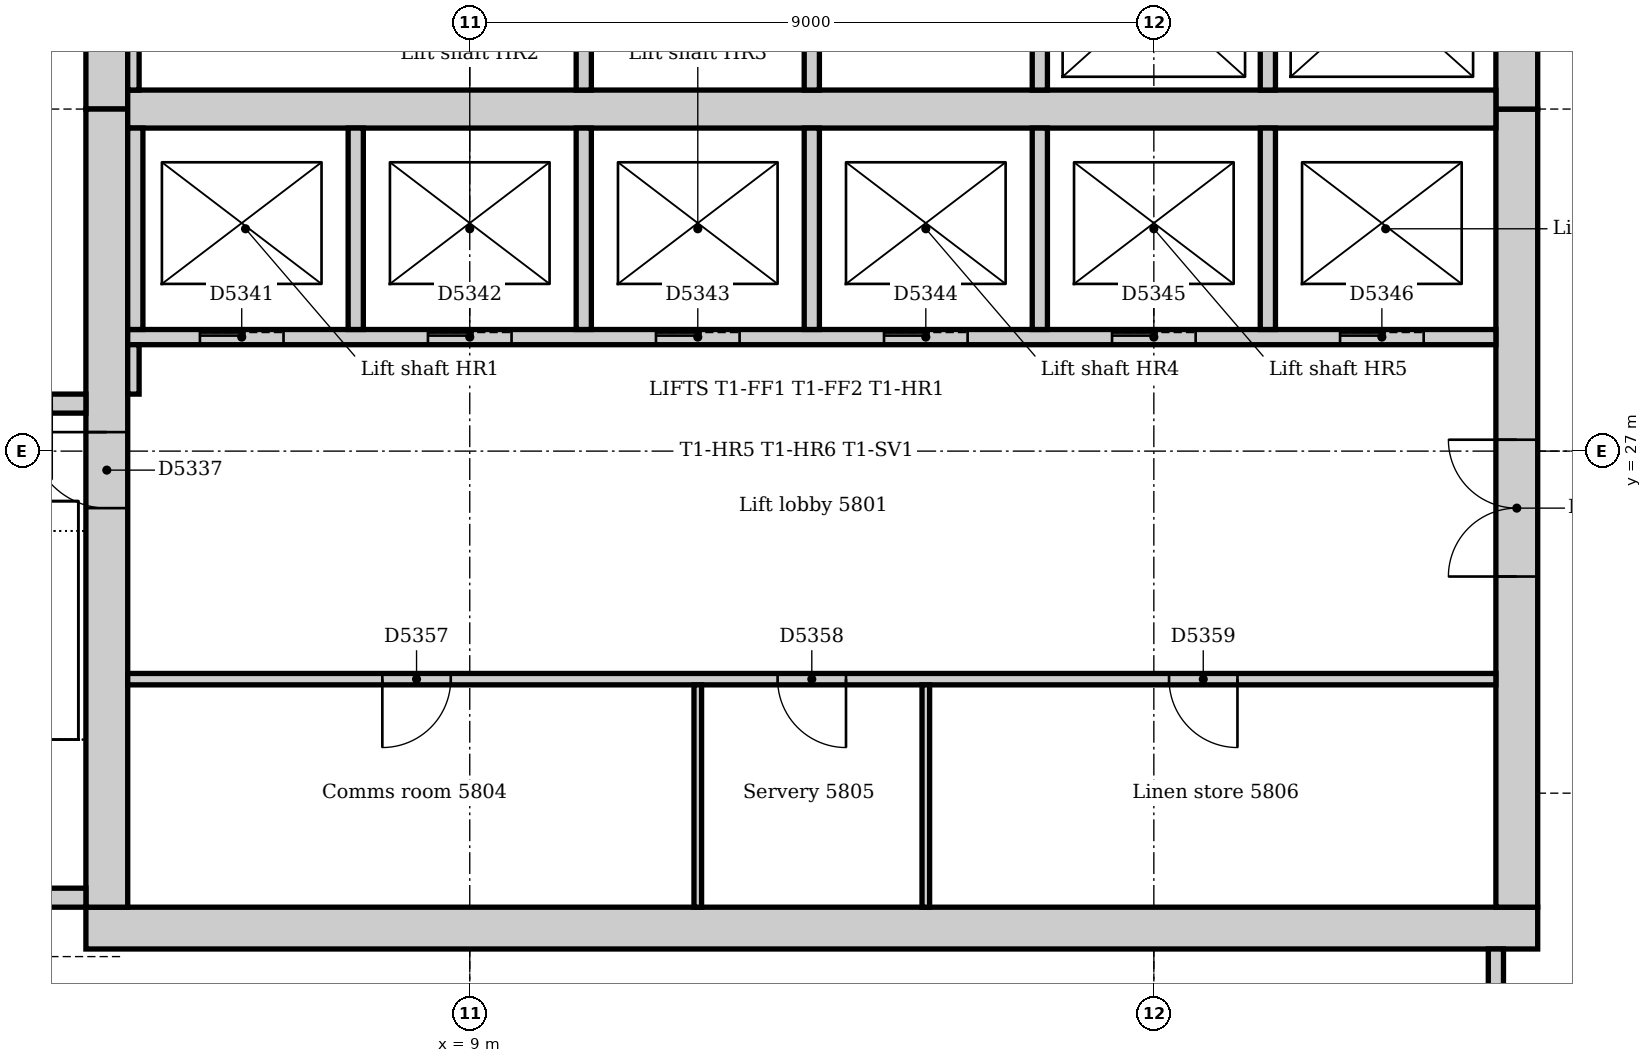
"""IFC4 building model, lengths in metres.
Left out: names, types, materials, properties, quantities, classifications, styles, units other than length and angle.
Written with IfcOpenShell. Run it as: python <this file> out.ifc"""

import sys

from ifc_helpers import new_model, si_unit, direction, frame, frame_2d, origin, place, context, subcontext, project, spatial, rectangle, extrude, element, fill, save


model = new_model("IFC4")
c1 = context("Model", 3, precision=1e-05, world=origin(), true_north=direction((0.0, 1.0)))
c2 = subcontext(c1, "Body", "Model", "MODEL_VIEW")
j1 = project(units=[si_unit("LENGTHUNIT", "METRE"), si_unit("PLANEANGLEUNIT", "RADIAN")], contexts=[c1])
p1 = place(None, origin())
s1 = spatial("IfcSite", under=j1, at=p1, CompositionType="ELEMENT")
p2 = place(p1, origin())
s2 = spatial("IfcBuilding", under=s1, at=p2, CompositionType="ELEMENT")
p3 = place(p2, frame((0.0, 0.0, 242.0)))
s3 = spatial("IfcBuildingStorey", under=s2, at=p3, CompositionType="ELEMENT", Elevation=242.0)
p4 = place(p3, frame((3.95, 20.725, 0.0), z_axis=(0.0, 0.0, 1.0), x_axis=(1.0, 0.0, 0.0)))
e1 = element("IfcWall", 1, at=p4, inside=s3, PredefinedType="SOLIDWALL", context=c2, shape_type="SweptSolid", body=[
    extrude(rectangle(XDim=19.1, YDim=0.55, at=frame_2d((9.55, 0.0))), origin(), (0.0, 0.0, 1.0), 5.0),
])
p5 = place(p3, frame((22.775, 21.0, 0.0), z_axis=(0.0, 0.0, 1.0), x_axis=(0.0, 1.0, 0.0)))
e2 = element("IfcWall", 2, at=p5, inside=s3, PredefinedType="SOLIDWALL", context=c2, shape_type="SweptSolid", body=[
    extrude(rectangle(XDim=10.5, YDim=0.55, at=frame_2d((5.25, 0.0))), origin(), (0.0, 0.0, 1.0), 5.0),
])
p6 = place(p5, frame((4.35, 0.0, 0.0)))
e3 = element("IfcOpeningElement", 3, at=p6, cuts=e2, PredefinedType="OPENING", context=c2, shape_type="SweptSolid", body=[
    extrude(rectangle(XDim=1.8, YDim=2.1, at=frame_2d((0.9, 1.05))), frame((0.0, 0.285, 0.0), z_axis=(0.0, -1.0, 0.0), x_axis=(1.0, 0.0, 0.0)), (0.0, 0.0, 1.0), 0.57),
])
p7 = place(p3, frame((22.775, 31.5, 0.0), z_axis=(0.0, 0.0, 1.0), x_axis=(0.0, 1.0, 0.0)))
e4 = element("IfcWall", 4, at=p7, inside=s3, PredefinedType="SOLIDWALL", context=c2, shape_type="SweptSolid", body=[
    extrude(rectangle(XDim=10.5, YDim=0.55, at=frame_2d((5.25, 0.0))), origin(), (0.0, 0.0, 1.0), 5.0),
])
p8 = place(p7, frame((3.15, 0.0, 0.0)))
e5 = element("IfcOpeningElement", 5, at=p8, cuts=e4, PredefinedType="OPENING", context=c2, shape_type="SweptSolid", body=[
    extrude(rectangle(XDim=1.0, YDim=2.1, at=frame_2d((0.5, 1.05))), frame((0.0, 0.285, 0.0), z_axis=(0.0, -1.0, 0.0), x_axis=(1.0, 0.0, 0.0)), (0.0, 0.0, 1.0), 0.57),
])
p9 = place(p7, frame((5.2, 0.0, 0.0)))
e6 = element("IfcOpeningElement", 6, at=p9, cuts=e4, PredefinedType="OPENING", context=c2, shape_type="SweptSolid", body=[
    extrude(rectangle(XDim=1.0, YDim=2.1, at=frame_2d((0.5, 1.05))), frame((0.0, 0.285, 0.0), z_axis=(0.0, -1.0, 0.0), x_axis=(1.0, 0.0, 0.0)), (0.0, 0.0, 1.0), 0.57),
])
p10 = place(p3, frame((4.225, 42.0, 0.0), z_axis=(0.0, 0.0, 1.0), x_axis=(0.0, -1.0, 0.0)))
e7 = element("IfcWall", 7, at=p10, inside=s3, PredefinedType="SOLIDWALL", context=c2, shape_type="SweptSolid", body=[
    extrude(rectangle(XDim=10.5, YDim=0.55, at=frame_2d((5.25, 0.0))), origin(), (0.0, 0.0, 1.0), 5.0),
])
p11 = place(p10, frame((5.3, 0.0, 0.0)))
e8 = element("IfcOpeningElement", 8, at=p11, cuts=e7, PredefinedType="OPENING", context=c2, shape_type="SweptSolid", body=[
    extrude(rectangle(XDim=1.0, YDim=2.1, at=frame_2d((0.5, 1.05))), frame((0.0, 0.285, 0.0), z_axis=(0.0, -1.0, 0.0), x_axis=(1.0, 0.0, 0.0)), (0.0, 0.0, 1.0), 0.57),
])
p12 = place(p3, frame((4.225, 31.5, 0.0), z_axis=(0.0, 0.0, 1.0), x_axis=(0.0, -1.0, 0.0)))
e9 = element("IfcWall", 9, at=p12, inside=s3, PredefinedType="SOLIDWALL", context=c2, shape_type="SweptSolid", body=[
    extrude(rectangle(XDim=10.5, YDim=0.55, at=frame_2d((5.25, 0.0))), origin(), (0.0, 0.0, 1.0), 5.0),
])
p13 = place(p12, frame((4.25, 0.0, 0.0)))
e10 = element("IfcOpeningElement", 10, at=p13, cuts=e9, PredefinedType="OPENING", context=c2, shape_type="SweptSolid", body=[
    extrude(rectangle(XDim=1.0, YDim=2.1, at=frame_2d((0.5, 1.05))), frame((0.0, 0.285, 0.0), z_axis=(0.0, -1.0, 0.0), x_axis=(1.0, 0.0, 0.0)), (0.0, 0.0, 1.0), 0.57),
])
p14 = place(p3, frame((4.5, 31.5, 0.0), z_axis=(0.0, 0.0, 1.0), x_axis=(1.0, 0.0, 0.0)))
e11 = element("IfcWall", 11, at=p14, inside=s3, PredefinedType="SOLIDWALL", context=c2, shape_type="SweptSolid", body=[
    extrude(rectangle(XDim=18.0, YDim=0.5, at=frame_2d((9.0, 0.0))), origin(), (0.0, 0.0, 1.0), 5.0),
])
p15 = place(p3, frame((0.36, 21.125, 0.0), z_axis=(0.0, 0.0, 1.0), x_axis=(1.0, 0.0, 0.0)))
e12 = element("IfcWall", 12, at=p15, inside=s3, PredefinedType="SOLIDWALL", context=c2, shape_type="SweptSolid", body=[
    extrude(rectangle(XDim=3.59, YDim=0.25, at=frame_2d((1.795, 0.0))), origin(), (0.0, 0.0, 1.0), 5.0),
])
p16 = place(p3, frame((3.95, 27.625, 0.0), z_axis=(0.0, 0.0, 1.0), x_axis=(-1.0, 0.0, 0.0)))
e13 = element("IfcWall", 13, at=p16, inside=s3, PredefinedType="SOLIDWALL", context=c2, shape_type="SweptSolid", body=[
    extrude(rectangle(XDim=3.59, YDim=0.25, at=frame_2d((1.795, 0.0))), origin(), (0.0, 0.0, 1.0), 5.0),
])
p17 = place(p16, frame((0.45, 0.0, 0.0)))
e14 = element("IfcOpeningElement", 14, at=p17, cuts=e13, PredefinedType="OPENING", context=c2, shape_type="SweptSolid", body=[
    extrude(rectangle(XDim=1.0, YDim=2.1, at=frame_2d((0.5, 1.05))), frame((0.0, 0.135, 0.0), z_axis=(0.0, -1.0, 0.0), x_axis=(1.0, 0.0, 0.0)), (0.0, 0.0, 1.0), 0.27),
])
p18 = place(p3, frame((22.5, 18.1, 0.0), z_axis=(0.0, 0.0, 1.0), x_axis=(0.0, 1.0, 0.0)))
e15 = element("IfcWall", 15, at=p18, inside=s3, PredefinedType="PARTITIONING", context=c2, shape_type="SweptSolid", body=[
    extrude(rectangle(XDim=2.35, YDim=0.2, at=frame_2d((1.175, 0.0))), origin(), (0.0, 0.0, 1.0), 4.85),
])
p19 = place(p18, frame((0.65, 0.0, 0.0)))
e16 = element("IfcOpeningElement", 16, at=p19, cuts=e15, PredefinedType="OPENING", context=c2, shape_type="SweptSolid", body=[
    extrude(rectangle(XDim=1.0, YDim=2.1, at=frame_2d((0.5, 1.05))), frame((0.0, 0.11, 0.0), z_axis=(0.0, -1.0, 0.0), x_axis=(1.0, 0.0, 0.0)), (0.0, 0.0, 1.0), 0.22),
])
p20 = place(p3, frame((4.5, 28.5, 0.0), z_axis=(0.0, 0.0, 1.0), x_axis=(1.0, 0.0, 0.0)))
e17 = element("IfcWall", 17, at=p20, inside=s3, PredefinedType="PARTITIONING", context=c2, shape_type="SweptSolid", body=[
    extrude(rectangle(XDim=18.0, YDim=0.2, at=frame_2d((9.0, 0.0))), origin(), (0.0, 0.0, 1.0), 4.85),
])
p21 = place(p20, frame((0.95, 0.0, 0.0)))
e18 = element("IfcOpeningElement", 18, at=p21, cuts=e17, PredefinedType="OPENING", context=c2, shape_type="SweptSolid", body=[
    extrude(rectangle(XDim=1.1, YDim=2.1, at=frame_2d((0.55, 1.05))), frame((0.0, 0.11, 0.0), z_axis=(0.0, -1.0, 0.0), x_axis=(1.0, 0.0, 0.0)), (0.0, 0.0, 1.0), 0.22),
])
p22 = place(p20, frame((3.95, 0.0, 0.0)))
e19 = element("IfcOpeningElement", 19, at=p22, cuts=e17, PredefinedType="OPENING", context=c2, shape_type="SweptSolid", body=[
    extrude(rectangle(XDim=1.1, YDim=2.1, at=frame_2d((0.55, 1.05))), frame((0.0, 0.11, 0.0), z_axis=(0.0, -1.0, 0.0), x_axis=(1.0, 0.0, 0.0)), (0.0, 0.0, 1.0), 0.22),
])
p23 = place(p20, frame((6.95, 0.0, 0.0)))
e20 = element("IfcOpeningElement", 20, at=p23, cuts=e17, PredefinedType="OPENING", context=c2, shape_type="SweptSolid", body=[
    extrude(rectangle(XDim=1.1, YDim=2.1, at=frame_2d((0.55, 1.05))), frame((0.0, 0.11, 0.0), z_axis=(0.0, -1.0, 0.0), x_axis=(1.0, 0.0, 0.0)), (0.0, 0.0, 1.0), 0.22),
])
p24 = place(p20, frame((9.95, 0.0, 0.0)))
e21 = element("IfcOpeningElement", 21, at=p24, cuts=e17, PredefinedType="OPENING", context=c2, shape_type="SweptSolid", body=[
    extrude(rectangle(XDim=1.1, YDim=2.1, at=frame_2d((0.55, 1.05))), frame((0.0, 0.11, 0.0), z_axis=(0.0, -1.0, 0.0), x_axis=(1.0, 0.0, 0.0)), (0.0, 0.0, 1.0), 0.22),
])
p25 = place(p20, frame((12.95, 0.0, 0.0)))
e22 = element("IfcOpeningElement", 22, at=p25, cuts=e17, PredefinedType="OPENING", context=c2, shape_type="SweptSolid", body=[
    extrude(rectangle(XDim=1.1, YDim=2.1, at=frame_2d((0.55, 1.05))), frame((0.0, 0.11, 0.0), z_axis=(0.0, -1.0, 0.0), x_axis=(1.0, 0.0, 0.0)), (0.0, 0.0, 1.0), 0.22),
])
p26 = place(p20, frame((15.95, 0.0, 0.0)))
e23 = element("IfcOpeningElement", 23, at=p26, cuts=e17, PredefinedType="OPENING", context=c2, shape_type="SweptSolid", body=[
    extrude(rectangle(XDim=1.1, YDim=2.1, at=frame_2d((0.55, 1.05))), frame((0.0, 0.11, 0.0), z_axis=(0.0, -1.0, 0.0), x_axis=(1.0, 0.0, 0.0)), (0.0, 0.0, 1.0), 0.22),
])
for number, where, z_axis, x_axis in (
    (24, (10.5, 28.6, 0.0), (0.0, 0.0, 1.0), (0.0, 1.0, 0.0)),
    (25, (10.5, 31.75, 0.0), (0.0, 0.0, 1.0), (0.0, 1.0, 0.0)),
    (26, (13.5, 28.6, 0.0), (0.0, 0.0, 1.0), (0.0, 1.0, 0.0)),
    (27, (13.5, 31.75, 0.0), (0.0, 0.0, 1.0), (0.0, 1.0, 0.0)),
    (28, (16.5, 28.6, 0.0), (0.0, 0.0, 1.0), (0.0, 1.0, 0.0)),
    (29, (16.5, 31.75, 0.0), (0.0, 0.0, 1.0), (0.0, 1.0, 0.0)),
    (30, (19.5, 28.6, 0.0), (0.0, 0.0, 1.0), (0.0, 1.0, 0.0)),
    (31, (19.5, 31.75, 0.0), (0.0, 0.0, 1.0), (0.0, 1.0, 0.0)),
    (32, (4.6, 28.6, 0.0), (0.0, 0.0, 1.0), (0.0, 1.0, 0.0)),
    (33, (7.5, 28.6, 0.0), (0.0, 0.0, 1.0), (0.0, 1.0, 0.0)),
):
    element("IfcWall", number, at=place(p3, frame(where, z_axis=z_axis, x_axis=x_axis)), inside=s3, PredefinedType="PARTITIONING", context=c2, shape_type="SweptSolid", body=[
        extrude(rectangle(XDim=2.65, YDim=0.2, at=frame_2d((1.325, 0.0))), origin(), (0.0, 0.0, 1.0), 4.85),
    ])
p27 = place(p3, frame((4.5, 24.0, 0.0), z_axis=(0.0, 0.0, 1.0), x_axis=(1.0, 0.0, 0.0)))
e34 = element("IfcWall", 34, at=p27, inside=s3, PredefinedType="PARTITIONING", context=c2, shape_type="SweptSolid", body=[
    extrude(rectangle(XDim=18.0, YDim=0.15, at=frame_2d((9.0, 0.0))), origin(), (0.0, 0.0, 1.0), 4.85),
])
p28 = place(p27, frame((3.35, 0.0, 0.0)))
e35 = element("IfcOpeningElement", 35, at=p28, cuts=e34, PredefinedType="OPENING", context=c2, shape_type="SweptSolid", body=[
    extrude(rectangle(XDim=0.9, YDim=2.1, at=frame_2d((0.45, 1.05))), frame((0.0, 0.085, 0.0), z_axis=(0.0, -1.0, 0.0), x_axis=(1.0, 0.0, 0.0)), (0.0, 0.0, 1.0), 0.17),
])
p29 = place(p27, frame((8.55, 0.0, 0.0)))
e36 = element("IfcOpeningElement", 36, at=p29, cuts=e34, PredefinedType="OPENING", context=c2, shape_type="SweptSolid", body=[
    extrude(rectangle(XDim=0.9, YDim=2.1, at=frame_2d((0.45, 1.05))), frame((0.0, 0.085, 0.0), z_axis=(0.0, -1.0, 0.0), x_axis=(1.0, 0.0, 0.0)), (0.0, 0.0, 1.0), 0.17),
])
p30 = place(p27, frame((13.7, 0.0, 0.0)))
e37 = element("IfcOpeningElement", 37, at=p30, cuts=e34, PredefinedType="OPENING", context=c2, shape_type="SweptSolid", body=[
    extrude(rectangle(XDim=0.9, YDim=2.1, at=frame_2d((0.45, 1.05))), frame((0.0, 0.085, 0.0), z_axis=(0.0, -1.0, 0.0), x_axis=(1.0, 0.0, 0.0)), (0.0, 0.0, 1.0), 0.17),
])
p31 = place(p3, frame((4.575, 31.75, 0.0), z_axis=(0.0, 0.0, 1.0), x_axis=(0.0, 1.0, 0.0)))
e38 = element("IfcWall", 38, at=p31, inside=s3, PredefinedType="PARTITIONING", context=c2, shape_type="SweptSolid", body=[
    extrude(rectangle(XDim=2.675, YDim=0.15, at=frame_2d((1.337, 0.0))), origin(), (0.0, 0.0, 1.0), 4.85),
])
p32 = place(p3, frame((4.575, 27.75, 0.0), z_axis=(0.0, 0.0, 1.0), x_axis=(0.0, 1.0, 0.0)))
e39 = element("IfcWall", 39, at=p32, inside=s3, PredefinedType="PARTITIONING", context=c2, shape_type="SweptSolid", body=[
    extrude(rectangle(XDim=0.65, YDim=0.15, at=frame_2d((0.325, 0.0))), origin(), (0.0, 0.0, 1.0), 4.85),
])
for number, where, z_axis, x_axis in (
    (40, (12.0, 21.0, 0.0), (0.0, 0.0, 1.0), (0.0, 1.0, 0.0)),
    (41, (15.0, 21.0, 0.0), (0.0, 0.0, 1.0), (0.0, 1.0, 0.0)),
):
    element("IfcWall", number, at=place(p3, frame(where, z_axis=z_axis, x_axis=x_axis)), inside=s3, PredefinedType="PARTITIONING", context=c2, shape_type="SweptSolid", body=[
        extrude(rectangle(XDim=2.925, YDim=0.1, at=frame_2d((1.462, 0.0))), origin(), (0.0, 0.0, 1.0), 4.85),
    ])
p33 = place(p13, frame((1.0, 0.0, 0.0), z_axis=(0.0, 0.0, 1.0), x_axis=(-1.0, 0.0, 0.0)))
e42 = element("IfcDoor", 42, at=p33, inside=s3, OperationType="SINGLE_SWING_RIGHT", PredefinedType="DOOR", context=c2, shape_type="SweptSolid", body=[
    extrude(rectangle(XDim=1.0, YDim=2.1, at=frame_2d((0.5, 1.05))), frame((0.0, 0.025, 0.0), z_axis=(0.0, -1.0, 0.0), x_axis=(1.0, 0.0, 0.0)), (0.0, 0.0, 1.0), 0.05),
])
fill(e10, e42)
p34 = place(p21, origin())
e43 = element("IfcDoor", 43, at=p34, inside=s3, OperationType="SLIDING_TO_LEFT", PredefinedType="DOOR", context=c2, shape_type="SweptSolid", body=[
    extrude(rectangle(XDim=1.1, YDim=2.1, at=frame_2d((0.55, 1.05))), frame((0.0, 0.025, 0.0), z_axis=(0.0, -1.0, 0.0), x_axis=(1.0, 0.0, 0.0)), (0.0, 0.0, 1.0), 0.05),
])
fill(e18, e43)
p35 = place(p22, origin())
e44 = element("IfcDoor", 44, at=p35, inside=s3, OperationType="SLIDING_TO_LEFT", PredefinedType="DOOR", context=c2, shape_type="SweptSolid", body=[
    extrude(rectangle(XDim=1.1, YDim=2.1, at=frame_2d((0.55, 1.05))), frame((0.0, 0.025, 0.0), z_axis=(0.0, -1.0, 0.0), x_axis=(1.0, 0.0, 0.0)), (0.0, 0.0, 1.0), 0.05),
])
fill(e19, e44)
p36 = place(p23, origin())
e45 = element("IfcDoor", 45, at=p36, inside=s3, OperationType="SLIDING_TO_LEFT", PredefinedType="DOOR", context=c2, shape_type="SweptSolid", body=[
    extrude(rectangle(XDim=1.1, YDim=2.1, at=frame_2d((0.55, 1.05))), frame((0.0, 0.025, 0.0), z_axis=(0.0, -1.0, 0.0), x_axis=(1.0, 0.0, 0.0)), (0.0, 0.0, 1.0), 0.05),
])
fill(e20, e45)
p37 = place(p24, origin())
e46 = element("IfcDoor", 46, at=p37, inside=s3, OperationType="SLIDING_TO_LEFT", PredefinedType="DOOR", context=c2, shape_type="SweptSolid", body=[
    extrude(rectangle(XDim=1.1, YDim=2.1, at=frame_2d((0.55, 1.05))), frame((0.0, 0.025, 0.0), z_axis=(0.0, -1.0, 0.0), x_axis=(1.0, 0.0, 0.0)), (0.0, 0.0, 1.0), 0.05),
])
fill(e21, e46)
p38 = place(p25, origin())
e47 = element("IfcDoor", 47, at=p38, inside=s3, OperationType="SLIDING_TO_LEFT", PredefinedType="DOOR", context=c2, shape_type="SweptSolid", body=[
    extrude(rectangle(XDim=1.1, YDim=2.1, at=frame_2d((0.55, 1.05))), frame((0.0, 0.025, 0.0), z_axis=(0.0, -1.0, 0.0), x_axis=(1.0, 0.0, 0.0)), (0.0, 0.0, 1.0), 0.05),
])
fill(e22, e47)
p39 = place(p26, origin())
e48 = element("IfcDoor", 48, at=p39, inside=s3, OperationType="SLIDING_TO_LEFT", PredefinedType="DOOR", context=c2, shape_type="SweptSolid", body=[
    extrude(rectangle(XDim=1.1, YDim=2.1, at=frame_2d((0.55, 1.05))), frame((0.0, 0.025, 0.0), z_axis=(0.0, -1.0, 0.0), x_axis=(1.0, 0.0, 0.0)), (0.0, 0.0, 1.0), 0.05),
])
fill(e23, e48)
p40 = place(p6, origin())
e49 = element("IfcDoor", 49, at=p40, inside=s3, OperationType="DOUBLE_DOOR_DOUBLE_SWING", PredefinedType="DOOR", context=c2, shape_type="SweptSolid", body=[
    extrude(rectangle(XDim=1.8, YDim=2.1, at=frame_2d((0.9, 1.05))), frame((0.0, 0.025, 0.0), z_axis=(0.0, -1.0, 0.0), x_axis=(1.0, 0.0, 0.0)), (0.0, 0.0, 1.0), 0.05),
])
fill(e3, e49)
p41 = place(p28, frame((0.9, 0.0, 0.0), z_axis=(0.0, 0.0, 1.0), x_axis=(-1.0, 0.0, 0.0)))
e50 = element("IfcDoor", 50, at=p41, inside=s3, OperationType="SINGLE_SWING_RIGHT", PredefinedType="DOOR", context=c2, shape_type="SweptSolid", body=[
    extrude(rectangle(XDim=0.9, YDim=2.1, at=frame_2d((0.45, 1.05))), frame((0.0, 0.025, 0.0), z_axis=(0.0, -1.0, 0.0), x_axis=(1.0, 0.0, 0.0)), (0.0, 0.0, 1.0), 0.05),
])
fill(e35, e50)
p42 = place(p29, frame((0.9, 0.0, 0.0), z_axis=(0.0, 0.0, 1.0), x_axis=(-1.0, 0.0, 0.0)))
e51 = element("IfcDoor", 51, at=p42, inside=s3, OperationType="SINGLE_SWING_LEFT", PredefinedType="DOOR", context=c2, shape_type="SweptSolid", body=[
    extrude(rectangle(XDim=0.9, YDim=2.1, at=frame_2d((0.45, 1.05))), frame((0.0, 0.025, 0.0), z_axis=(0.0, -1.0, 0.0), x_axis=(1.0, 0.0, 0.0)), (0.0, 0.0, 1.0), 0.05),
])
fill(e36, e51)
p43 = place(p30, frame((0.9, 0.0, 0.0), z_axis=(0.0, 0.0, 1.0), x_axis=(-1.0, 0.0, 0.0)))
e52 = element("IfcDoor", 52, at=p43, inside=s3, OperationType="SINGLE_SWING_LEFT", PredefinedType="DOOR", context=c2, shape_type="SweptSolid", body=[
    extrude(rectangle(XDim=0.9, YDim=2.1, at=frame_2d((0.45, 1.05))), frame((0.0, 0.025, 0.0), z_axis=(0.0, -1.0, 0.0), x_axis=(1.0, 0.0, 0.0)), (0.0, 0.0, 1.0), 0.05),
])
fill(e37, e52)
save(model, sys.argv[1])
